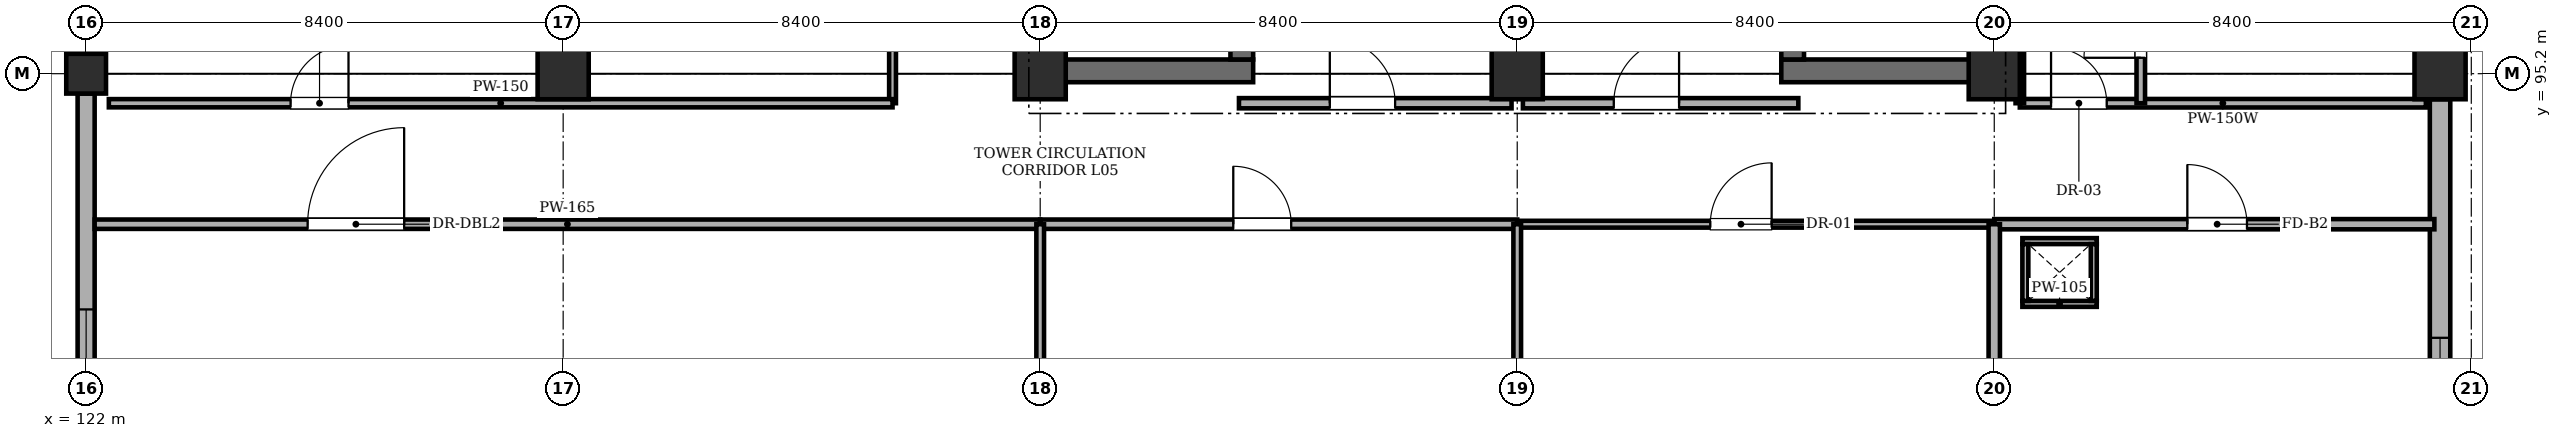
"""IFC4 building model, lengths in metres.
Left out: names, types, materials, properties, quantities, classifications, styles, units other than length and angle.
Written with IfcOpenShell. Run it as: python <this file> out.ifc"""

import sys

from ifc_helpers import new_model, si_unit, direction, frame, frame_2d, origin, origin_2d, place, context, subcontext, project, spatial, rectangle, extrude, element, fill, save


model = new_model("IFC4")
c1 = context("Model", 3, precision=1e-05, world=origin(), true_north=direction((0.0, 1.0)))
c2 = subcontext(c1, "Body", "Model", "MODEL_VIEW")
j1 = project(units=[si_unit("LENGTHUNIT", "METRE"), si_unit("PLANEANGLEUNIT", "RADIAN")], contexts=[c1])
p1 = place(None, origin())
s1 = spatial("IfcSite", under=j1, at=p1, CompositionType="ELEMENT")
p2 = place(p1, origin())
s2 = spatial("IfcBuilding", under=s1, at=p2, CompositionType="ELEMENT")
p3 = place(p2, frame((0.0, 0.0, 19.2)))
s3 = spatial("IfcBuildingStorey", under=s2, at=p3, CompositionType="ELEMENT", Elevation=19.2)
p4 = place(p3, frame((122.0, 95.2, 0.0), z_axis=(0.0, 0.0, 1.0), x_axis=(1.0, 0.0, 0.0)))
e1 = element("IfcColumn", 1, at=p4, inside=s3, PredefinedType="COLUMN", context=c2, shape_type="SweptSolid", body=[
    extrude(rectangle(XDim=0.7, YDim=0.7, at=origin_2d()), origin(), (0.0, 0.0, 1.0), 4.02),
])
for number, where, z_axis, x_axis in (
    (2, (130.4, 95.2, 0.0), (0.0, 0.0, 1.0), (1.0, 0.0, 0.0)),
    (3, (138.8, 95.2, 0.0), (0.0, 0.0, 1.0), (1.0, 0.0, 0.0)),
    (4, (147.2, 95.2, 0.0), (0.0, 0.0, 1.0), (1.0, 0.0, 0.0)),
    (5, (155.6, 95.2, 0.0), (0.0, 0.0, 1.0), (1.0, 0.0, 0.0)),
    (6, (163.45, 95.2, 0.0), (0.0, 0.0, 1.0), (1.0, 0.0, 0.0)),
):
    element("IfcColumn", number, at=place(p3, frame(where, z_axis=z_axis, x_axis=x_axis)), inside=s3, PredefinedType="COLUMN", context=c2, shape_type="SweptSolid", body=[
        extrude(rectangle(XDim=0.9, YDim=0.9, at=origin_2d()), origin(), (0.0, 0.0, 1.0), 4.02),
    ])
p5 = place(p3, frame((138.65, 95.25, 0.0), z_axis=(0.0, 0.0, 1.0), x_axis=(1.0, 0.0, 0.0)))
e7 = element("IfcWall", 7, at=p5, inside=s3, PredefinedType="SHEAR", context=c2, shape_type="SweptSolid", body=[
    extrude(rectangle(XDim=3.9, YDim=0.4, at=frame_2d((1.95, 0.0))), origin(), (0.0, 0.0, 1.0), 4.02),
])
p6 = place(p3, frame((138.85, 95.45, 0.0), z_axis=(0.0, 0.0, 1.0), x_axis=(0.0, 1.0, 0.0)))
e8 = element("IfcWall", 8, at=p6, inside=s3, PredefinedType="SHEAR", context=c2, shape_type="SweptSolid", body=[
    extrude(rectangle(XDim=7.9, YDim=0.4, at=frame_2d((3.95, 0.0))), origin(), (0.0, 0.0, 1.0), 4.02),
])
p7 = place(p3, frame((142.35, 95.45, 0.0), z_axis=(0.0, 0.0, 1.0), x_axis=(0.0, 1.0, 0.0)))
e9 = element("IfcWall", 9, at=p7, inside=s3, PredefinedType="SHEAR", context=c2, shape_type="SweptSolid", body=[
    extrude(rectangle(XDim=7.9, YDim=0.4, at=frame_2d((3.95, 0.0))), origin(), (0.0, 0.0, 1.0), 4.02),
])
p8 = place(p7, frame((0.22, 0.0, 0.0)))
e10 = element("IfcOpeningElement", 10, at=p8, cuts=e9, PredefinedType="OPENING", context=c2, shape_type="SweptSolid", body=[
    extrude(rectangle(XDim=1.15, YDim=2.15, at=frame_2d((0.575, 1.075))), frame((0.0, 0.21, 0.0), z_axis=(0.0, -1.0, 0.0), x_axis=(1.0, 0.0, 0.0)), (0.0, 0.0, 1.0), 0.42),
])
p9 = place(p3, frame((151.85, 95.25, 0.0), z_axis=(0.0, 0.0, 1.0), x_axis=(1.0, 0.0, 0.0)))
e11 = element("IfcWall", 11, at=p9, inside=s3, PredefinedType="SHEAR", context=c2, shape_type="SweptSolid", body=[
    extrude(rectangle(XDim=3.9, YDim=0.4, at=frame_2d((1.95, 0.0))), origin(), (0.0, 0.0, 1.0), 4.02),
])
p10 = place(p3, frame((152.05, 95.45, 0.0), z_axis=(0.0, 0.0, 1.0), x_axis=(0.0, 1.0, 0.0)))
e12 = element("IfcWall", 12, at=p10, inside=s3, PredefinedType="SHEAR", context=c2, shape_type="SweptSolid", body=[
    extrude(rectangle(XDim=7.9, YDim=0.4, at=frame_2d((3.95, 0.0))), origin(), (0.0, 0.0, 1.0), 4.02),
])
p11 = place(p10, frame((0.35, 0.0, 0.0)))
e13 = element("IfcOpeningElement", 13, at=p11, cuts=e12, PredefinedType="OPENING", context=c2, shape_type="SweptSolid", body=[
    extrude(rectangle(XDim=1.15, YDim=2.15, at=frame_2d((0.575, 1.075))), frame((0.0, 0.21, 0.0), z_axis=(0.0, -1.0, 0.0), x_axis=(1.0, 0.0, 0.0)), (0.0, 0.0, 1.0), 0.42),
])
p12 = place(p3, frame((155.55, 95.45, 0.0), z_axis=(0.0, 0.0, 1.0), x_axis=(0.0, 1.0, 0.0)))
e14 = element("IfcWall", 14, at=p12, inside=s3, PredefinedType="SHEAR", context=c2, shape_type="SweptSolid", body=[
    extrude(rectangle(XDim=7.9, YDim=0.4, at=frame_2d((3.95, 0.0))), origin(), (0.0, 0.0, 1.0), 4.02),
])
p13 = place(p3, frame((163.45, 94.75, 0.0), z_axis=(0.0, 0.0, 1.0), x_axis=(0.0, -1.0, 0.0)))
e15 = element("IfcWall", 15, at=p13, inside=s3, PredefinedType="STANDARD", context=c2, shape_type="SweptSolid", body=[
    extrude(rectangle(XDim=7.5, YDim=0.36, at=frame_2d((3.75, 0.0))), origin(), (0.0, 0.0, 1.0), 3.32),
])
p14 = place(p13, frame((4.2, 0.0, 1.1)))
e16 = element("IfcOpeningElement", 16, at=p14, cuts=e15, PredefinedType="OPENING", context=c2, shape_type="SweptSolid", body=[
    extrude(rectangle(XDim=1.8, YDim=1.8, at=frame_2d((0.9, 0.9))), frame((0.0, 0.19, 0.0), z_axis=(0.0, -1.0, 0.0), x_axis=(1.0, 0.0, 0.0)), (0.0, 0.0, 1.0), 0.38),
])
p15 = place(p3, frame((122.0, 87.15, 0.0), z_axis=(0.0, 0.0, 1.0), x_axis=(0.0, 1.0, 0.0)))
e17 = element("IfcWall", 17, at=p15, inside=s3, PredefinedType="STANDARD", context=c2, shape_type="SweptSolid", body=[
    extrude(rectangle(XDim=7.7, YDim=0.3, at=frame_2d((3.85, 0.0))), origin(), (0.0, 0.0, 1.0), 3.32),
])
p16 = place(p15, frame((2.4, 0.0, 0.95)))
e18 = element("IfcOpeningElement", 18, at=p16, cuts=e17, PredefinedType="OPENING", context=c2, shape_type="SweptSolid", body=[
    extrude(rectangle(XDim=1.5, YDim=1.8, at=frame_2d((0.75, 0.9))), frame((0.0, 0.16, 0.0), z_axis=(0.0, -1.0, 0.0), x_axis=(1.0, 0.0, 0.0)), (0.0, 0.0, 1.0), 0.32),
])
p17 = place(p3, frame((122.0, 95.55, 0.0), z_axis=(0.0, 0.0, 1.0), x_axis=(0.0, 1.0, 0.0)))
e19 = element("IfcWall", 19, at=p17, inside=s3, PredefinedType="STANDARD", context=c2, shape_type="SweptSolid", body=[
    extrude(rectangle(XDim=7.7, YDim=0.3, at=frame_2d((3.85, 0.0))), origin(), (0.0, 0.0, 1.0), 3.32),
])
p18 = place(p17, frame((2.4, 0.0, 1.0)))
e20 = element("IfcOpeningElement", 20, at=p18, cuts=e19, PredefinedType="OPENING", context=c2, shape_type="SweptSolid", body=[
    extrude(rectangle(XDim=1.8, YDim=1.8, at=frame_2d((0.9, 0.9))), frame((0.0, 0.16, 0.0), z_axis=(0.0, -1.0, 0.0), x_axis=(1.0, 0.0, 0.0)), (0.0, 0.0, 1.0), 0.32),
])
p19 = place(p3, frame((142.3, 94.68, 0.0), z_axis=(0.0, 0.0, 1.0), x_axis=(1.0, 0.0, 0.0)))
e21 = element("IfcWall", 21, at=p19, inside=s3, PredefinedType="STANDARD", context=c2, shape_type="SweptSolid", body=[
    extrude(rectangle(XDim=4.8, YDim=0.18, at=frame_2d((2.4, 0.0))), origin(), (0.0, 0.0, 1.0), 4.02),
])
p20 = place(p19, frame((1.6, 0.0, 0.0)))
e22 = element("IfcOpeningElement", 22, at=p20, cuts=e21, PredefinedType="OPENING", context=c2, shape_type="SweptSolid", body=[
    extrude(rectangle(XDim=1.15, YDim=2.15, at=frame_2d((0.575, 1.075))), frame((0.0, 0.1, 0.0), z_axis=(0.0, -1.0, 0.0), x_axis=(1.0, 0.0, 0.0)), (0.0, 0.0, 1.0), 0.2),
])
p21 = place(p3, frame((147.3, 94.68, 0.0), z_axis=(0.0, 0.0, 1.0), x_axis=(1.0, 0.0, 0.0)))
e23 = element("IfcWall", 23, at=p21, inside=s3, PredefinedType="STANDARD", context=c2, shape_type="SweptSolid", body=[
    extrude(rectangle(XDim=4.85, YDim=0.18, at=frame_2d((2.425, 0.0))), origin(), (0.0, 0.0, 1.0), 4.02),
])
p22 = place(p21, frame((1.6, 0.0, 0.0)))
e24 = element("IfcOpeningElement", 24, at=p22, cuts=e23, PredefinedType="OPENING", context=c2, shape_type="SweptSolid", body=[
    extrude(rectangle(XDim=1.15, YDim=2.15, at=frame_2d((0.575, 1.075))), frame((0.0, 0.1, 0.0), z_axis=(0.0, -1.0, 0.0), x_axis=(1.0, 0.0, 0.0)), (0.0, 0.0, 1.0), 0.2),
])
p23 = place(p3, frame((156.05, 94.68, 0.0), z_axis=(0.0, 0.0, 1.0), x_axis=(1.0, 0.0, 0.0)))
e25 = element("IfcWall", 25, at=p23, inside=s3, PredefinedType="PARTITIONING", context=c2, shape_type="SweptSolid", body=[
    extrude(rectangle(XDim=7.15, YDim=0.15, at=frame_2d((3.575, 0.0))), origin(), (0.0, 0.0, 1.0), 4.02),
])
p24 = place(p23, frame((0.55, 0.0, 0.0)))
e26 = element("IfcOpeningElement", 26, at=p24, cuts=e25, PredefinedType="OPENING", context=c2, shape_type="SweptSolid", body=[
    extrude(rectangle(XDim=0.98, YDim=2.12, at=frame_2d((0.49, 1.06))), frame((0.0, 0.085, 0.0), z_axis=(0.0, -1.0, 0.0), x_axis=(1.0, 0.0, 0.0)), (0.0, 0.0, 1.0), 0.17),
])
p25 = place(p3, frame((158.18, 94.68, 0.0), z_axis=(0.0, 0.0, 1.0), x_axis=(0.0, 1.0, 0.0)))
e27 = element("IfcWall", 27, at=p25, inside=s3, PredefinedType="PARTITIONING", context=c2, shape_type="SweptSolid", body=[
    extrude(rectangle(XDim=8.57, YDim=0.15, at=frame_2d((4.285, 0.0))), origin(), (0.0, 0.0, 1.0), 4.02),
])
p26 = place(p25, frame((0.8, 0.0, 0.0)))
e28 = element("IfcOpeningElement", 28, at=p26, cuts=e27, PredefinedType="OPENING", context=c2, shape_type="SweptSolid", body=[
    extrude(rectangle(XDim=1.0, YDim=2.12, at=frame_2d((0.5, 1.06))), frame((0.0, 0.085, 0.0), z_axis=(0.0, -1.0, 0.0), x_axis=(1.0, 0.0, 0.0)), (0.0, 0.0, 1.0), 0.17),
])
p27 = place(p25, frame((3.5, 0.0, 0.0)))
e29 = element("IfcOpeningElement", 29, at=p27, cuts=e27, PredefinedType="OPENING", context=c2, shape_type="SweptSolid", body=[
    extrude(rectangle(XDim=0.92, YDim=2.1, at=frame_2d((0.46, 1.05))), frame((0.0, 0.085, 0.0), z_axis=(0.0, -1.0, 0.0), x_axis=(1.0, 0.0, 0.0)), (0.0, 0.0, 1.0), 0.17),
])
p28 = place(p25, frame((6.4, 0.0, 0.0)))
e30 = element("IfcOpeningElement", 30, at=p28, cuts=e27, PredefinedType="OPENING", context=c2, shape_type="SweptSolid", body=[
    extrude(rectangle(XDim=0.92, YDim=2.1, at=frame_2d((0.46, 1.05))), frame((0.0, 0.085, 0.0), z_axis=(0.0, -1.0, 0.0), x_axis=(1.0, 0.0, 0.0)), (0.0, 0.0, 1.0), 0.17),
])
p29 = place(p3, frame((156.05, 94.68, 0.0), z_axis=(0.0, 0.0, 1.0), x_axis=(0.0, 1.0, 0.0)))
e31 = element("IfcWall", 31, at=p29, inside=s3, PredefinedType="PARTITIONING", context=c2, shape_type="SweptSolid", body=[
    extrude(rectangle(XDim=8.57, YDim=0.15, at=frame_2d((4.285, 0.0))), origin(), (0.0, 0.0, 1.0), 4.02),
])
p30 = place(p3, frame((136.2, 94.68, 0.0), z_axis=(0.0, 0.0, 1.0), x_axis=(0.0, 1.0, 0.0)))
e32 = element("IfcWall", 32, at=p30, inside=s3, PredefinedType="PARTITIONING", context=c2, shape_type="SweptSolid", body=[
    extrude(rectangle(XDim=9.07, YDim=0.12, at=frame_2d((4.535, 0.0))), origin(), (0.0, 0.0, 1.0), 4.02),
])
p31 = place(p3, frame((122.4, 94.68, 0.0), z_axis=(0.0, 0.0, 1.0), x_axis=(1.0, 0.0, 0.0)))
e33 = element("IfcWall", 33, at=p31, inside=s3, PredefinedType="PARTITIONING", context=c2, shape_type="SweptSolid", body=[
    extrude(rectangle(XDim=13.8, YDim=0.145, at=frame_2d((6.9, 0.0))), origin(), (0.0, 0.0, 1.0), 4.02),
])
p32 = place(p31, frame((3.2, 0.0, 0.0)))
e34 = element("IfcOpeningElement", 34, at=p32, cuts=e33, PredefinedType="OPENING", context=c2, shape_type="SweptSolid", body=[
    extrude(rectangle(XDim=1.02, YDim=2.15, at=frame_2d((0.51, 1.075))), frame((0.0, 0.083, 0.0), z_axis=(0.0, -1.0, 0.0), x_axis=(1.0, 0.0, 0.0)), (0.0, 0.0, 1.0), 0.165),
])
p33 = place(p3, frame((122.15, 92.55, 0.0), z_axis=(0.0, 0.0, 1.0), x_axis=(1.0, 0.0, 0.0)))
e35 = element("IfcWall", 35, at=p33, inside=s3, PredefinedType="PARTITIONING", context=c2, shape_type="SweptSolid", body=[
    extrude(rectangle(XDim=16.65, YDim=0.165, at=frame_2d((8.325, 0.0))), origin(), (0.0, 0.0, 1.0), 4.02),
])
p34 = place(p33, frame((3.75, 0.0, 0.0)))
e36 = element("IfcOpeningElement", 36, at=p34, cuts=e35, PredefinedType="OPENING", context=c2, shape_type="SweptSolid", body=[
    extrude(rectangle(XDim=1.7, YDim=2.2, at=frame_2d((0.85, 1.1))), frame((0.0, 0.093, 0.0), z_axis=(0.0, -1.0, 0.0), x_axis=(1.0, 0.0, 0.0)), (0.0, 0.0, 1.0), 0.185),
])
p35 = place(p3, frame((138.8, 92.55, 0.0), z_axis=(0.0, 0.0, 1.0), x_axis=(1.0, 0.0, 0.0)))
e37 = element("IfcWall", 37, at=p35, inside=s3, PredefinedType="PARTITIONING", context=c2, shape_type="SweptSolid", body=[
    extrude(rectangle(XDim=8.4, YDim=0.165, at=frame_2d((4.2, 0.0))), origin(), (0.0, 0.0, 1.0), 4.02),
])
p36 = place(p35, frame((3.4, 0.0, 0.0)))
e38 = element("IfcOpeningElement", 38, at=p36, cuts=e37, PredefinedType="OPENING", context=c2, shape_type="SweptSolid", body=[
    extrude(rectangle(XDim=1.02, YDim=2.15, at=frame_2d((0.51, 1.075))), frame((0.0, 0.093, 0.0), z_axis=(0.0, -1.0, 0.0), x_axis=(1.0, 0.0, 0.0)), (0.0, 0.0, 1.0), 0.185),
])
p37 = place(p3, frame((138.8, 78.55, 0.0), z_axis=(0.0, 0.0, 1.0), x_axis=(0.0, 1.0, 0.0)))
e39 = element("IfcWall", 39, at=p37, inside=s3, PredefinedType="PARTITIONING", context=c2, shape_type="SweptSolid", body=[
    extrude(rectangle(XDim=14.0, YDim=0.135, at=frame_2d((7.0, 0.0))), origin(), (0.0, 0.0, 1.0), 3.32),
])
p38 = place(p3, frame((147.2, 92.55, 0.0), z_axis=(0.0, 0.0, 1.0), x_axis=(1.0, 0.0, 0.0)))
e40 = element("IfcWall", 40, at=p38, inside=s3, PredefinedType="PARTITIONING", context=c2, shape_type="SweptSolid", body=[
    extrude(rectangle(XDim=8.4, YDim=0.12, at=frame_2d((4.2, 0.0))), origin(), (0.0, 0.0, 1.0), 4.02),
])
p39 = place(p38, frame((3.4, 0.0, 0.0)))
e41 = element("IfcOpeningElement", 41, at=p39, cuts=e40, PredefinedType="OPENING", context=c2, shape_type="SweptSolid", body=[
    extrude(rectangle(XDim=1.08, YDim=2.15, at=frame_2d((0.54, 1.075))), frame((0.0, 0.07, 0.0), z_axis=(0.0, -1.0, 0.0), x_axis=(1.0, 0.0, 0.0)), (0.0, 0.0, 1.0), 0.14),
])
p40 = place(p3, frame((147.2, 78.55, 0.0), z_axis=(0.0, 0.0, 1.0), x_axis=(0.0, 1.0, 0.0)))
e42 = element("IfcWall", 42, at=p40, inside=s3, PredefinedType="PARTITIONING", context=c2, shape_type="SweptSolid", body=[
    extrude(rectangle(XDim=14.0, YDim=0.135, at=frame_2d((7.0, 0.0))), origin(), (0.0, 0.0, 1.0), 3.32),
])
p41 = place(p3, frame((155.6, 92.55, 0.0), z_axis=(0.0, 0.0, 1.0), x_axis=(1.0, 0.0, 0.0)))
e43 = element("IfcWall", 43, at=p41, inside=s3, PredefinedType="STANDARD", context=c2, shape_type="SweptSolid", body=[
    extrude(rectangle(XDim=7.75, YDim=0.18, at=frame_2d((3.875, 0.0))), origin(), (0.0, 0.0, 1.0), 4.02),
])
p42 = place(p41, frame((3.4, 0.0, 0.0)))
e44 = element("IfcOpeningElement", 44, at=p42, cuts=e43, PredefinedType="OPENING", context=c2, shape_type="SweptSolid", body=[
    extrude(rectangle(XDim=1.05, YDim=2.15, at=frame_2d((0.525, 1.075))), frame((0.0, 0.1, 0.0), z_axis=(0.0, -1.0, 0.0), x_axis=(1.0, 0.0, 0.0)), (0.0, 0.0, 1.0), 0.2),
])
p43 = place(p3, frame((155.6, 78.55, 0.0), z_axis=(0.0, 0.0, 1.0), x_axis=(0.0, 1.0, 0.0)))
e45 = element("IfcWall", 45, at=p43, inside=s3, PredefinedType="SOLIDWALL", context=c2, shape_type="SweptSolid", body=[
    extrude(rectangle(XDim=14.0, YDim=0.2, at=frame_2d((7.0, 0.0))), origin(), (0.0, 0.0, 1.0), 3.32),
])
for number, where, z_axis, x_axis in (
    (46, (156.095, 91.147, 0.0), (0.0, 0.0, 1.0), (1.0, 0.0, 0.0)),
    (47, (156.095, 92.252, 0.0), (0.0, 0.0, 1.0), (1.0, 0.0, 0.0)),
):
    element("IfcWall", number, at=place(p3, frame(where, z_axis=z_axis, x_axis=x_axis)), inside=s3, PredefinedType="PARTITIONING", context=c2, shape_type="SweptSolid", body=[
        extrude(rectangle(XDim=1.31, YDim=0.105, at=frame_2d((0.655, 0.0))), origin(), (0.0, 0.0, 1.0), 4.02),
    ])
for number, where, z_axis, x_axis in (
    (48, (156.147, 91.2, 0.0), (0.0, 0.0, 1.0), (0.0, 1.0, 0.0)),
    (49, (157.353, 91.2, 0.0), (0.0, 0.0, 1.0), (0.0, 1.0, 0.0)),
):
    element("IfcWall", number, at=place(p3, frame(where, z_axis=z_axis, x_axis=x_axis)), inside=s3, PredefinedType="PARTITIONING", context=c2, shape_type="SweptSolid", body=[
        extrude(rectangle(XDim=1.0, YDim=0.105, at=frame_2d((0.5, 0.0))), origin(), (0.0, 0.0, 1.0), 4.02),
    ])
p44 = place(p14, origin())
e50 = element("IfcWindow", 50, at=p44, inside=s3, PartitioningType="DOUBLE_PANEL_VERTICAL", PredefinedType="WINDOW", context=c2, shape_type="SweptSolid", body=[
    extrude(rectangle(XDim=1.8, YDim=1.8, at=frame_2d((0.9, 0.9))), frame((0.0, 0.03, 0.0), z_axis=(0.0, -1.0, 0.0), x_axis=(1.0, 0.0, 0.0)), (0.0, 0.0, 1.0), 0.06),
])
fill(e16, e50)
p45 = place(p16, origin())
e51 = element("IfcWindow", 51, at=p45, inside=s3, PartitioningType="DOUBLE_PANEL_VERTICAL", PredefinedType="WINDOW", context=c2, shape_type="SweptSolid", body=[
    extrude(rectangle(XDim=1.5, YDim=1.8, at=frame_2d((0.75, 0.9))), frame((0.0, 0.03, 0.0), z_axis=(0.0, -1.0, 0.0), x_axis=(1.0, 0.0, 0.0)), (0.0, 0.0, 1.0), 0.06),
])
fill(e18, e51)
p46 = place(p20, origin())
e52 = element("IfcDoor", 52, at=p46, inside=s3, OperationType="SINGLE_SWING_LEFT", PredefinedType="DOOR", context=c2, shape_type="SweptSolid", body=[
    extrude(rectangle(XDim=1.15, YDim=2.15, at=frame_2d((0.575, 1.075))), frame((0.0, 0.025, 0.0), z_axis=(0.0, -1.0, 0.0), x_axis=(1.0, 0.0, 0.0)), (0.0, 0.0, 1.0), 0.05),
])
fill(e22, e52)
p47 = place(p22, origin())
e53 = element("IfcDoor", 53, at=p47, inside=s3, OperationType="SINGLE_SWING_RIGHT", PredefinedType="DOOR", context=c2, shape_type="SweptSolid", body=[
    extrude(rectangle(XDim=1.15, YDim=2.15, at=frame_2d((0.575, 1.075))), frame((0.0, 0.025, 0.0), z_axis=(0.0, -1.0, 0.0), x_axis=(1.0, 0.0, 0.0)), (0.0, 0.0, 1.0), 0.05),
])
fill(e24, e53)
p48 = place(p24, origin())
e54 = element("IfcDoor", 54, at=p48, inside=s3, OperationType="SINGLE_SWING_LEFT", PredefinedType="DOOR", context=c2, shape_type="SweptSolid", body=[
    extrude(rectangle(XDim=0.98, YDim=2.12, at=frame_2d((0.49, 1.06))), frame((0.0, 0.025, 0.0), z_axis=(0.0, -1.0, 0.0), x_axis=(1.0, 0.0, 0.0)), (0.0, 0.0, 1.0), 0.05),
])
fill(e26, e54)
p49 = place(p26, origin())
e55 = element("IfcDoor", 55, at=p49, inside=s3, OperationType="SINGLE_SWING_LEFT", PredefinedType="DOOR", context=c2, shape_type="SweptSolid", body=[
    extrude(rectangle(XDim=1.0, YDim=2.12, at=frame_2d((0.5, 1.06))), frame((0.0, 0.025, 0.0), z_axis=(0.0, -1.0, 0.0), x_axis=(1.0, 0.0, 0.0)), (0.0, 0.0, 1.0), 0.05),
])
fill(e28, e55)
p50 = place(p32, origin())
e56 = element("IfcDoor", 56, at=p50, inside=s3, OperationType="SINGLE_SWING_RIGHT", PredefinedType="DOOR", context=c2, shape_type="SweptSolid", body=[
    extrude(rectangle(XDim=1.02, YDim=2.15, at=frame_2d((0.51, 1.075))), frame((0.0, 0.025, 0.0), z_axis=(0.0, -1.0, 0.0), x_axis=(1.0, 0.0, 0.0)), (0.0, 0.0, 1.0), 0.05),
])
fill(e34, e56)
p51 = place(p34, origin())
e57 = element("IfcDoor", 57, at=p51, inside=s3, OperationType="SINGLE_SWING_RIGHT", PredefinedType="DOOR", context=c2, shape_type="SweptSolid", body=[
    extrude(rectangle(XDim=1.7, YDim=2.2, at=frame_2d((0.85, 1.1))), frame((0.0, 0.025, 0.0), z_axis=(0.0, -1.0, 0.0), x_axis=(1.0, 0.0, 0.0)), (0.0, 0.0, 1.0), 0.05),
])
fill(e36, e57)
p52 = place(p36, origin())
e58 = element("IfcDoor", 58, at=p52, inside=s3, OperationType="SINGLE_SWING_LEFT", PredefinedType="DOOR", context=c2, shape_type="SweptSolid", body=[
    extrude(rectangle(XDim=1.02, YDim=2.15, at=frame_2d((0.51, 1.075))), frame((0.0, 0.025, 0.0), z_axis=(0.0, -1.0, 0.0), x_axis=(1.0, 0.0, 0.0)), (0.0, 0.0, 1.0), 0.05),
])
fill(e38, e58)
p53 = place(p39, origin())
e59 = element("IfcDoor", 59, at=p53, inside=s3, OperationType="SINGLE_SWING_RIGHT", PredefinedType="DOOR", context=c2, shape_type="SweptSolid", body=[
    extrude(rectangle(XDim=1.08, YDim=2.15, at=frame_2d((0.54, 1.075))), frame((0.0, 0.025, 0.0), z_axis=(0.0, -1.0, 0.0), x_axis=(1.0, 0.0, 0.0)), (0.0, 0.0, 1.0), 0.05),
])
fill(e41, e59)
p54 = place(p42, origin())
e60 = element("IfcDoor", 60, at=p54, inside=s3, OperationType="SINGLE_SWING_LEFT", PredefinedType="DOOR", context=c2, shape_type="SweptSolid", body=[
    extrude(rectangle(XDim=1.05, YDim=2.15, at=frame_2d((0.525, 1.075))), frame((0.0, 0.025, 0.0), z_axis=(0.0, -1.0, 0.0), x_axis=(1.0, 0.0, 0.0)), (0.0, 0.0, 1.0), 0.05),
])
fill(e44, e60)
save(model, sys.argv[1])
